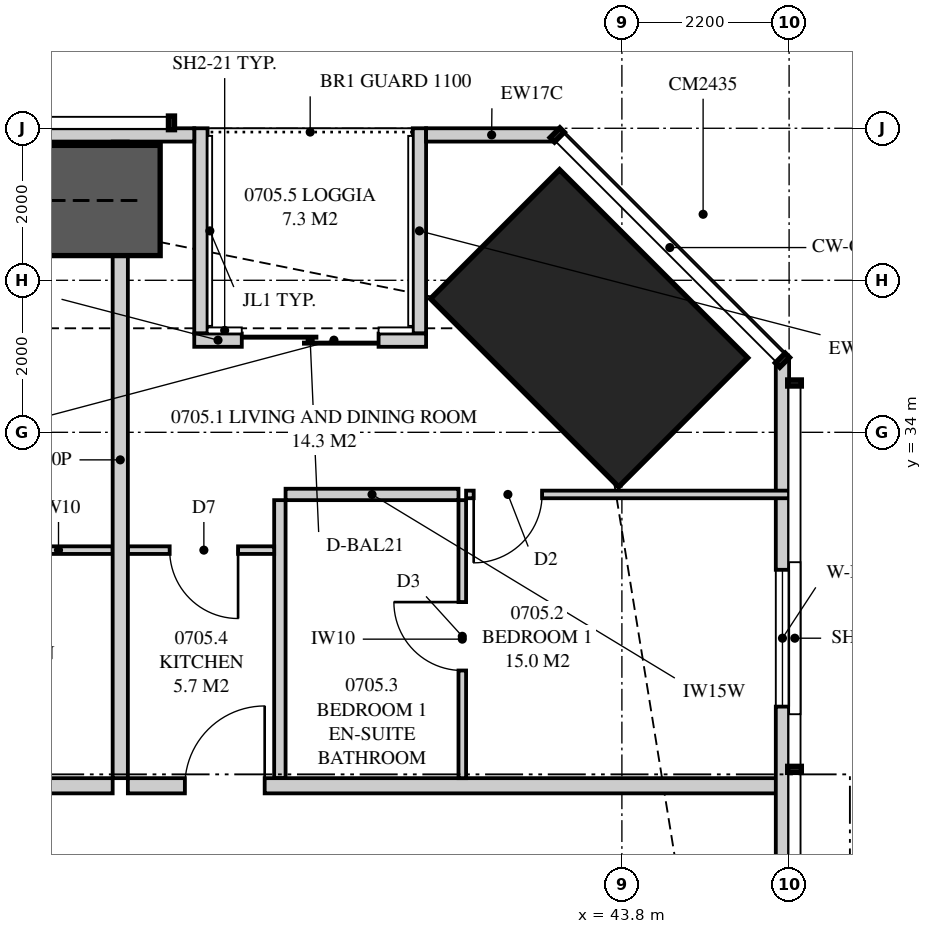
"""IFC4 building model, lengths in metres.
Left out: names, types, materials, properties, quantities, classifications, styles, units other than length and angle.
Written with IfcOpenShell. Run it as: python <this file> out.ifc"""

import sys

from ifc_helpers import new_model, si_unit, direction, frame, frame_2d, origin, origin_2d, place, context, subcontext, project, spatial, polyline, rectangle, outline, extrude, element, fill, save


model = new_model("IFC4")
c1 = context("Model", 3, precision=1e-05, world=origin(), true_north=direction((0.0, 1.0)))
c2 = subcontext(c1, "Body", "Model", "MODEL_VIEW")
j1 = project(units=[si_unit("LENGTHUNIT", "METRE"), si_unit("PLANEANGLEUNIT", "RADIAN")], contexts=[c1])
p1 = place(None, origin())
s1 = spatial("IfcSite", under=j1, at=p1, CompositionType="ELEMENT")
p2 = place(p1, origin())
s2 = spatial("IfcBuilding", under=s1, at=p2, CompositionType="ELEMENT")
p3 = place(p2, frame((0.0, 0.0, 31.05)))
s3 = spatial("IfcBuildingStorey", under=s2, at=p3, CompositionType="ELEMENT", Elevation=31.05)
p4 = place(p3, frame((43.369, 35.369, 0.0), z_axis=(0.0, 0.0, 1.0), x_axis=(-0.707106781187, -0.707106781187, 0.0)))
e1 = element("IfcColumn", 1, at=p4, inside=s3, PredefinedType="COLUMN", context=c2, shape_type="SweptSolid", body=[
    extrude(rectangle(XDim=2.4, YDim=3.5, at=origin_2d()), origin(), (0.0, 0.0, 1.0), 3.35),
])
p5 = place(p3, frame((45.913, 3.051, 0.0), z_axis=(0.0, 0.0, 1.0), x_axis=(0.0, 1.0, 0.0)))
e2 = element("IfcWall", 2, at=p5, inside=s3, PredefinedType="SOLIDWALL", context=c2, shape_type="SweptSolid", body=[
    extrude(outline(polyline([(0.0, 0.0), (31.897, 0.0), (31.897, 3.11), (22.167, 3.11), (22.167, 2.15), (22.074, 2.15), (22.074, 3.11), (21.949, 3.11), (21.949, 2.15), (9.949, 2.15), (9.949, 3.11), (9.823, 3.11), (9.823, 2.15), (9.73, 2.15), (9.73, 3.11), (0.0, 3.11), (0.0, 0.0)])), frame((0.0, 0.087, 0.0), z_axis=(0.0, -1.0, 0.0), x_axis=(1.0, 0.0, 0.0)), (0.0, 0.0, 1.0), 0.175),
])
p6 = place(p5, frame((2.257, 0.0, 0.4)))
e3 = element("IfcOpeningElement", 3, at=p6, cuts=e2, PredefinedType="OPENING", context=c2, shape_type="SweptSolid", body=[
    extrude(rectangle(XDim=1.8, YDim=1.7, at=frame_2d((0.9, 0.85))), frame((0.0, 0.097, 0.0), z_axis=(0.0, -1.0, 0.0), x_axis=(1.0, 0.0, 0.0)), (0.0, 0.0, 1.0), 0.195),
])
p7 = place(p5, frame((14.849, 0.0, 0.4)))
e4 = element("IfcOpeningElement", 4, at=p7, cuts=e2, PredefinedType="OPENING", context=c2, shape_type="SweptSolid", body=[
    extrude(rectangle(XDim=1.2, YDim=1.7, at=frame_2d((0.6, 0.85))), frame((0.0, 0.097, 0.0), z_axis=(0.0, -1.0, 0.0), x_axis=(1.0, 0.0, 0.0)), (0.0, 0.0, 1.0), 0.195),
])
p8 = place(p5, frame((27.34, 0.0, 0.4)))
e5 = element("IfcOpeningElement", 5, at=p8, cuts=e2, PredefinedType="OPENING", context=c2, shape_type="SweptSolid", body=[
    extrude(rectangle(XDim=1.8, YDim=1.7, at=frame_2d((0.9, 0.85))), frame((0.0, 0.097, 0.0), z_axis=(0.0, -1.0, 0.0), x_axis=(1.0, 0.0, 0.0)), (0.0, 0.0, 1.0), 0.195),
])
p9 = place(p3, frame((42.949, 37.913, 0.0), z_axis=(0.0, 0.0, 1.0), x_axis=(-1.0, 0.0, 0.0)))
e6 = element("IfcWall", 6, at=p9, inside=s3, PredefinedType="SOLIDWALL", context=c2, shape_type="SweptSolid", body=[
    extrude(rectangle(XDim=1.725, YDim=0.175, at=frame_2d((0.863, 0.0))), origin(), (0.0, 0.0, 1.0), 3.11),
])
p10 = place(p3, frame((38.174, 37.913, 0.0), z_axis=(0.0, 0.0, 1.0), x_axis=(-1.0, 0.0, 0.0)))
e7 = element("IfcWall", 7, at=p10, inside=s3, PredefinedType="SOLIDWALL", context=c2, shape_type="SweptSolid", body=[
    extrude(outline(polyline([(0.0, 0.0), (8.565, 0.0), (8.565, 2.15), (3.174, 2.15), (3.174, 3.11), (3.018, 3.11), (3.018, 2.15), (2.97, 2.15), (2.97, 3.11), (0.0, 3.11), (0.0, 0.0)])), frame((0.0, 0.087, 0.0), z_axis=(0.0, -1.0, 0.0), x_axis=(1.0, 0.0, 0.0)), (0.0, 0.0, 1.0), 0.175),
])
p11 = place(p10, frame((6.092, 0.0, 0.4)))
e8 = element("IfcOpeningElement", 8, at=p11, cuts=e7, PredefinedType="OPENING", context=c2, shape_type="SweptSolid", body=[
    extrude(rectangle(XDim=1.2, YDim=1.7, at=frame_2d((0.6, 0.85))), frame((0.0, 0.097, 0.0), z_axis=(0.0, -1.0, 0.0), x_axis=(1.0, 0.0, 0.0)), (0.0, 0.0, 1.0), 0.195),
])
p12 = place(p3, frame((41.224, 35.212, 0.0), z_axis=(0.0, 0.0, 1.0), x_axis=(-1.0, 0.0, 0.0)))
e9 = element("IfcWall", 9, at=p12, inside=s3, PredefinedType="SOLIDWALL", context=c2, shape_type="SweptSolid", body=[
    extrude(rectangle(XDim=2.425, YDim=0.175, at=frame_2d((1.212, 0.0))), origin(), (0.0, 0.0, 1.0), 2.15),
])
p13 = place(p12, frame((0.625, 0.0, 0.0)))
e10 = element("IfcOpeningElement", 10, at=p13, cuts=e9, PredefinedType="OPENING", context=c2, shape_type="SweptSolid", body=[
    extrude(rectangle(XDim=1.8, YDim=2.1, at=frame_2d((0.9, 1.05))), frame((0.0, 0.097, 0.0), z_axis=(0.0, -1.0, 0.0), x_axis=(1.0, 0.0, 0.0)), (0.0, 0.0, 1.0), 0.195),
])
p14 = place(p3, frame((38.799, 35.212, 0.0), z_axis=(0.0, 0.0, 1.0), x_axis=(-1.0, 0.0, 0.0)))
e11 = element("IfcWall", 11, at=p14, inside=s3, PredefinedType="SOLIDWALL", context=c2, shape_type="SweptSolid", body=[
    extrude(rectangle(XDim=0.625, YDim=0.175, at=frame_2d((0.312, 0.0))), origin(), (0.0, 0.0, 1.0), 2.51),
])
p15 = place(p3, frame((41.136, 38.0, 0.0), z_axis=(0.0, 0.0, 1.0), x_axis=(0.0, -1.0, 0.0)))
e12 = element("IfcWall", 12, at=p15, inside=s3, PredefinedType="SOLIDWALL", context=c2, shape_type="SweptSolid", body=[
    extrude(outline(polyline([(0.0, 0.0), (2.7, 0.0), (2.7, 2.15), (1.349, 2.15), (1.349, 3.11), (0.0, 3.11), (0.0, 0.0)])), frame((0.0, 0.087, 0.0), z_axis=(0.0, -1.0, 0.0), x_axis=(1.0, 0.0, 0.0)), (0.0, 0.0, 1.0), 0.175),
])
p16 = place(p3, frame((38.261, 38.0, 0.0), z_axis=(0.0, 0.0, 1.0), x_axis=(0.0, -1.0, 0.0)))
e13 = element("IfcWall", 13, at=p16, inside=s3, PredefinedType="SOLIDWALL", context=c2, shape_type="SweptSolid", body=[
    extrude(outline(polyline([(0.0, 0.0), (2.7, 0.0), (2.7, 2.51), (2.439, 2.51), (2.439, 2.15), (0.772, 2.15), (0.772, 3.11), (0.0, 3.11), (0.0, 0.0)])), frame((0.0, 0.087, 0.0), z_axis=(0.0, -1.0, 0.0), x_axis=(1.0, 0.0, 0.0)), (0.0, 0.0, 1.0), 0.175),
])
p17 = place(p3, frame((37.2, 37.825, 0.0), z_axis=(0.0, 0.0, 1.0), x_axis=(0.0, -1.0, 0.0)))
e14 = element("IfcWall", 14, at=p17, inside=s3, PredefinedType="PARTITIONING", context=c2, shape_type="SweptSolid", body=[
    extrude(outline(polyline([(0.0, 0.0), (8.375, 0.0), (8.375, 3.11), (3.766, 3.11), (3.766, 2.51), (2.145, 2.51), (2.145, 2.15), (0.289, 2.15), (0.289, 3.11), (0.0, 3.11), (0.0, 0.0)])), frame((0.0, 0.1, 0.0), z_axis=(0.0, -1.0, 0.0), x_axis=(1.0, 0.0, 0.0)), (0.0, 0.0, 1.0), 0.2),
])
p18 = place(p3, frame((33.55, 32.45, 0.0), z_axis=(0.0, 0.0, 1.0), x_axis=(1.0, 0.0, 0.0)))
e15 = element("IfcWall", 15, at=p18, inside=s3, PredefinedType="PARTITIONING", context=c2, shape_type="SweptSolid", body=[
    extrude(outline(polyline([(0.0, 0.0), (3.55, 0.0), (3.55, 3.11), (1.737, 3.11), (1.737, 2.541), (1.163, 2.541), (1.163, 3.11), (0.0, 3.11), (0.0, 0.0)])), frame((0.0, 0.05, 0.0), z_axis=(0.0, -1.0, 0.0), x_axis=(1.0, 0.0, 0.0)), (0.0, 0.0, 1.0), 0.1),
])
p19 = place(p18, frame((1.3, 0.0, 0.0)))
e16 = element("IfcOpeningElement", 16, at=p19, cuts=e15, PredefinedType="OPENING", context=c2, shape_type="SweptSolid", body=[
    extrude(rectangle(XDim=0.9, YDim=2.1, at=frame_2d((0.45, 1.05))), frame((0.0, 0.06, 0.0), z_axis=(0.0, -1.0, 0.0), x_axis=(1.0, 0.0, 0.0)), (0.0, 0.0, 1.0), 0.12),
])
p20 = place(p3, frame((37.3, 29.35, 0.0), z_axis=(0.0, 0.0, 1.0), x_axis=(1.0, 0.0, 0.0)))
e17 = element("IfcWall", 17, at=p20, inside=s3, PredefinedType="PARTITIONING", context=c2, shape_type="SweptSolid", body=[
    extrude(outline(polyline([(0.0, 0.0), (8.7, 0.0), (8.7, 3.11), (7.967, 3.11), (7.967, 2.15), (6.123, 2.15), (6.123, 3.11), (0.0, 3.11), (0.0, 0.0)])), frame((0.0, 0.1, 0.0), z_axis=(0.0, -1.0, 0.0), x_axis=(1.0, 0.0, 0.0)), (0.0, 0.0, 1.0), 0.2),
])
p21 = place(p20, frame((0.75, 0.0, 0.0)))
e18 = element("IfcOpeningElement", 18, at=p21, cuts=e17, PredefinedType="OPENING", context=c2, shape_type="SweptSolid", body=[
    extrude(rectangle(XDim=1.05, YDim=2.2, at=frame_2d((0.525, 1.1))), frame((0.0, 0.11, 0.0), z_axis=(0.0, -1.0, 0.0), x_axis=(1.0, 0.0, 0.0)), (0.0, 0.0, 1.0), 0.22),
])
p22 = place(p3, frame((41.7, 33.108, 0.0), z_axis=(0.0, 0.0, 1.0), x_axis=(0.0, -1.0, 0.0)))
e19 = element("IfcWall", 19, at=p22, inside=s3, PredefinedType="PARTITIONING", context=c2, shape_type="SweptSolid", body=[
    extrude(rectangle(XDim=3.658, YDim=0.1, at=frame_2d((1.829, 0.0))), origin(), (0.0, 0.0, 1.0), 3.11),
])
p23 = place(p22, frame((1.341, 0.0, 0.0)))
e20 = element("IfcOpeningElement", 20, at=p23, cuts=e19, PredefinedType="OPENING", context=c2, shape_type="SweptSolid", body=[
    extrude(rectangle(XDim=0.9, YDim=2.1, at=frame_2d((0.45, 1.05))), frame((0.0, 0.06, 0.0), z_axis=(0.0, -1.0, 0.0), x_axis=(1.0, 0.0, 0.0)), (0.0, 0.0, 1.0), 0.12),
])
p24 = place(p3, frame((41.75, 33.183, 0.0), z_axis=(0.0, 0.0, 1.0), x_axis=(1.0, 0.0, 0.0)))
e21 = element("IfcWall", 21, at=p24, inside=s3, PredefinedType="PARTITIONING", context=c2, shape_type="SweptSolid", body=[
    extrude(outline(polyline([(0.0, 0.0), (4.25, 0.0), (4.25, 3.11), (2.844, 3.11), (2.844, 2.15), (1.102, 2.15), (1.102, 3.11), (0.0, 3.11), (0.0, 0.0)])), frame((0.0, 0.05, 0.0), z_axis=(0.0, -1.0, 0.0), x_axis=(1.0, 0.0, 0.0)), (0.0, 0.0, 1.0), 0.1),
])
p25 = place(p24, frame((0.1, 0.0, 0.0)))
e22 = element("IfcOpeningElement", 22, at=p25, cuts=e21, PredefinedType="OPENING", context=c2, shape_type="SweptSolid", body=[
    extrude(rectangle(XDim=0.9, YDim=2.1, at=frame_2d((0.45, 1.05))), frame((0.0, 0.06, 0.0), z_axis=(0.0, -1.0, 0.0), x_axis=(1.0, 0.0, 0.0)), (0.0, 0.0, 1.0), 0.12),
])
p26 = place(p3, frame((39.375, 33.183, 0.0), z_axis=(0.0, 0.0, 1.0), x_axis=(1.0, 0.0, 0.0)))
e23 = element("IfcWall", 23, at=p26, inside=s3, PredefinedType="PLUMBINGWALL", context=c2, shape_type="SweptSolid", body=[
    extrude(rectangle(XDim=2.275, YDim=0.15, at=frame_2d((1.137, 0.0))), origin(), (0.0, 0.0, 1.0), 3.11),
])
p27 = place(p3, frame((39.3, 33.108, 0.0), z_axis=(0.0, 0.0, 1.0), x_axis=(0.0, -1.0, 0.0)))
e24 = element("IfcWall", 24, at=p27, inside=s3, PredefinedType="PLUMBINGWALL", context=c2, shape_type="SweptSolid", body=[
    extrude(rectangle(XDim=3.658, YDim=0.15, at=frame_2d((1.829, 0.0))), origin(), (0.0, 0.0, 1.0), 3.11),
])
p28 = place(p3, frame((37.3, 32.45, 0.0), z_axis=(0.0, 0.0, 1.0), x_axis=(1.0, 0.0, 0.0)))
e25 = element("IfcWall", 25, at=p28, inside=s3, PredefinedType="PARTITIONING", context=c2, shape_type="SweptSolid", body=[
    extrude(rectangle(XDim=1.925, YDim=0.1, at=frame_2d((0.962, 0.0))), origin(), (0.0, 0.0, 1.0), 3.11),
])
p29 = place(p28, frame((0.55, 0.0, 0.0)))
e26 = element("IfcOpeningElement", 26, at=p29, cuts=e25, PredefinedType="OPENING", context=c2, shape_type="SweptSolid", body=[
    extrude(rectangle(XDim=0.9, YDim=2.1, at=frame_2d((0.45, 1.05))), frame((0.0, 0.06, 0.0), z_axis=(0.0, -1.0, 0.0), x_axis=(1.0, 0.0, 0.0)), (0.0, 0.0, 1.0), 0.12),
])
p30 = place(p3, frame((24.05, 29.35, 0.0), z_axis=(0.0, 0.0, 1.0), x_axis=(1.0, 0.0, 0.0)))
e27 = element("IfcWall", 27, at=p30, inside=s3, PredefinedType="PARTITIONING", context=c2, shape_type="SweptSolid", body=[
    extrude(outline(polyline([(0.0, 0.0), (13.05, 0.0), (13.05, 3.11), (11.287, 3.11), (11.287, 2.541), (10.613, 2.541), (10.613, 3.11), (0.287, 3.11), (0.287, 2.541), (0.0, 2.541), (0.0, 3.11), (0.0, 0.0)])), frame((0.0, 0.1, 0.0), z_axis=(0.0, -1.0, 0.0), x_axis=(1.0, 0.0, 0.0)), (0.0, 0.0, 1.0), 0.2),
])
p31 = place(p3, frame((32.275, 37.05, 0.0), z_axis=(0.0, 0.0, 1.0), x_axis=(1.0, 0.0, 0.0)))
e28 = element("IfcWall", 28, at=p31, inside=s3, PredefinedType="SHEAR", context=c2, shape_type="SweptSolid", body=[
    extrude(rectangle(XDim=5.45, YDim=1.45, at=frame_2d((2.725, 0.0))), origin(), (0.0, 0.0, 1.0), 3.35),
])
p32 = place(p8, origin())
e29 = element("IfcWindow", 29, at=p32, inside=s3, PartitioningType="SINGLE_PANEL", PredefinedType="WINDOW", context=c2, shape_type="SweptSolid", body=[
    extrude(rectangle(XDim=1.8, YDim=1.7, at=frame_2d((0.9, 0.85))), frame((0.0, 0.03, 0.0), z_axis=(0.0, -1.0, 0.0), x_axis=(1.0, 0.0, 0.0)), (0.0, 0.0, 1.0), 0.06),
])
fill(e5, e29)
p33 = place(p13, origin())
e30 = element("IfcDoor", 30, at=p33, inside=s3, OperationType="SLIDING_TO_LEFT", PredefinedType="DOOR", context=c2, shape_type="SweptSolid", body=[
    extrude(rectangle(XDim=1.8, YDim=2.1, at=frame_2d((0.9, 1.05))), frame((0.0, 0.025, 0.0), z_axis=(0.0, -1.0, 0.0), x_axis=(1.0, 0.0, 0.0)), (0.0, 0.0, 1.0), 0.05),
])
fill(e10, e30)
p34 = place(p21, origin())
e31 = element("IfcDoor", 31, at=p34, inside=s3, OperationType="SINGLE_SWING_RIGHT", PredefinedType="DOOR", context=c2, shape_type="SweptSolid", body=[
    extrude(rectangle(XDim=1.05, YDim=2.2, at=frame_2d((0.525, 1.1))), frame((0.0, 0.025, 0.0), z_axis=(0.0, -1.0, 0.0), x_axis=(1.0, 0.0, 0.0)), (0.0, 0.0, 1.0), 0.05),
])
fill(e18, e31)
p35 = place(p25, frame((0.9, 0.0, 0.0), z_axis=(0.0, 0.0, 1.0), x_axis=(-1.0, 0.0, 0.0)))
e32 = element("IfcDoor", 32, at=p35, inside=s3, OperationType="SINGLE_SWING_RIGHT", PredefinedType="DOOR", context=c2, shape_type="SweptSolid", body=[
    extrude(rectangle(XDim=0.9, YDim=2.1, at=frame_2d((0.45, 1.05))), frame((0.0, 0.025, 0.0), z_axis=(0.0, -1.0, 0.0), x_axis=(1.0, 0.0, 0.0)), (0.0, 0.0, 1.0), 0.05),
])
fill(e22, e32)
p36 = place(p23, frame((0.9, 0.0, 0.0), z_axis=(0.0, 0.0, 1.0), x_axis=(-1.0, 0.0, 0.0)))
e33 = element("IfcDoor", 33, at=p36, inside=s3, OperationType="SINGLE_SWING_RIGHT", PredefinedType="DOOR", context=c2, shape_type="SweptSolid", body=[
    extrude(rectangle(XDim=0.9, YDim=2.1, at=frame_2d((0.45, 1.05))), frame((0.0, 0.025, 0.0), z_axis=(0.0, -1.0, 0.0), x_axis=(1.0, 0.0, 0.0)), (0.0, 0.0, 1.0), 0.05),
])
fill(e20, e33)
p37 = place(p29, frame((0.9, 0.0, 0.0), z_axis=(0.0, 0.0, 1.0), x_axis=(-1.0, 0.0, 0.0)))
e34 = element("IfcDoor", 34, at=p37, inside=s3, OperationType="SINGLE_SWING_LEFT", PredefinedType="DOOR", context=c2, shape_type="SweptSolid", body=[
    extrude(rectangle(XDim=0.9, YDim=2.1, at=frame_2d((0.45, 1.05))), frame((0.0, 0.025, 0.0), z_axis=(0.0, -1.0, 0.0), x_axis=(1.0, 0.0, 0.0)), (0.0, 0.0, 1.0), 0.05),
])
fill(e26, e34)
save(model, sys.argv[1])
